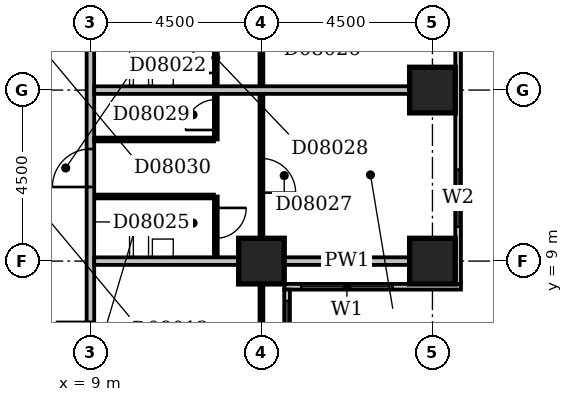
"""IFC4 building model, lengths in metres.
Left out: names, types, materials, properties, quantities, classifications, styles, units other than length and angle.
Written with IfcOpenShell. Run it as: python <this file> out.ifc"""

import sys

from ifc_helpers import new_model, si_unit, direction, frame, frame_2d, origin, origin_2d, place, context, subcontext, project, spatial, rectangle, extrude, element, fill, save


model = new_model("IFC4")
c1 = context("Model", 3, precision=1e-05, world=origin(), true_north=direction((0.0, 1.0)))
c2 = subcontext(c1, "Body", "Model", "MODEL_VIEW")
j1 = project(units=[si_unit("LENGTHUNIT", "METRE"), si_unit("PLANEANGLEUNIT", "RADIAN")], contexts=[c1])
p1 = place(None, origin())
s1 = spatial("IfcSite", under=j1, at=p1, CompositionType="ELEMENT")
p2 = place(p1, origin())
s2 = spatial("IfcBuilding", under=s1, at=p2, CompositionType="ELEMENT")
p3 = place(p2, frame((0.0, 0.0, 39.8)))
s3 = spatial("IfcBuildingStorey", under=s2, at=p3, CompositionType="ELEMENT", Elevation=39.8)
for number, where, z_axis, x_axis in (
    (1, (13.5, 9.0, -0.3), (0.0, 0.0, 1.0), (1.0, 0.0, 0.0)),
    (2, (18.0, 9.0, -0.3), (0.0, 0.0, 1.0), (1.0, 0.0, 0.0)),
    (3, (18.0, 13.5, -0.3), (0.0, 0.0, 1.0), (1.0, 0.0, 0.0)),
):
    element("IfcColumn", number, at=place(p3, frame(where, z_axis=z_axis, x_axis=x_axis)), inside=s3, PredefinedType="COLUMN", context=c2, shape_type="SweptSolid", body=[
        extrude(rectangle(XDim=1.2, YDim=1.2, at=origin_2d()), origin(), (0.0, 0.0, 1.0), 3.6),
    ])
p4 = place(p3, frame((14.175, 3.9, 0.0), z_axis=(0.0, 0.0, 1.0), x_axis=(0.0, 1.0, 0.0)))
e4 = element("IfcWall", 4, at=p4, inside=s3, PredefinedType="STANDARD", context=c2, shape_type="SweptSolid", body=[
    extrude(rectangle(XDim=4.35, YDim=0.15, at=frame_2d((2.175, 0.0))), origin(), (0.0, 0.0, 1.0), 2.7),
])
p5 = place(p4, frame((1.65, 0.0, 0.6)))
e5 = element("IfcOpeningElement", 5, at=p5, cuts=e4, PredefinedType="OPENING", context=c2, shape_type="SweptSolid", body=[
    extrude(rectangle(XDim=2.4, YDim=1.8, at=frame_2d((1.2, 0.9))), frame((0.0, 0.087, 0.0), z_axis=(0.0, -1.0, 0.0), x_axis=(1.0, 0.0, 0.0)), (0.0, 0.0, 1.0), 0.174),
])
p6 = place(p3, frame((14.1, 8.325, 0.0), z_axis=(0.0, 0.0, 1.0), x_axis=(1.0, 0.0, 0.0)))
e6 = element("IfcWall", 6, at=p6, inside=s3, PredefinedType="STANDARD", context=c2, shape_type="SweptSolid", body=[
    extrude(rectangle(XDim=4.65, YDim=0.15, at=frame_2d((2.325, 0.0))), origin(), (0.0, 0.0, 1.0), 2.7),
])
p7 = place(p6, frame((0.45, 0.0, 0.6)))
e7 = element("IfcOpeningElement", 7, at=p7, cuts=e6, PredefinedType="OPENING", context=c2, shape_type="SweptSolid", body=[
    extrude(rectangle(XDim=2.4, YDim=1.8, at=frame_2d((1.2, 0.9))), frame((0.0, 0.087, 0.0), z_axis=(0.0, -1.0, 0.0), x_axis=(1.0, 0.0, 0.0)), (0.0, 0.0, 1.0), 0.174),
])
p8 = place(p3, frame((18.675, 8.4, 0.0), z_axis=(0.0, 0.0, 1.0), x_axis=(0.0, 1.0, 0.0)))
e8 = element("IfcWall", 8, at=p8, inside=s3, PredefinedType="STANDARD", context=c2, shape_type="SweptSolid", body=[
    extrude(rectangle(XDim=8.85, YDim=0.15, at=frame_2d((4.425, 0.0))), origin(), (0.0, 0.0, 1.0), 2.7),
])
p9 = place(p8, frame((1.505, 0.0, 0.6)))
e9 = element("IfcOpeningElement", 9, at=p9, cuts=e8, PredefinedType="OPENING", context=c2, shape_type="SweptSolid", body=[
    extrude(rectangle(XDim=1.5, YDim=1.8, at=frame_2d((0.75, 0.9))), frame((0.0, 0.087, 0.0), z_axis=(0.0, -1.0, 0.0), x_axis=(1.0, 0.0, 0.0)), (0.0, 0.0, 1.0), 0.174),
])
p10 = place(p8, frame((6.15, 0.0, 0.6)))
e10 = element("IfcOpeningElement", 10, at=p10, cuts=e8, PredefinedType="OPENING", context=c2, shape_type="SweptSolid", body=[
    extrude(rectangle(XDim=2.4, YDim=1.8, at=frame_2d((1.2, 0.9))), frame((0.0, 0.087, 0.0), z_axis=(0.0, -1.0, 0.0), x_axis=(1.0, 0.0, 0.0)), (0.0, 0.0, 1.0), 0.174),
])
p11 = place(p3, frame((9.0, 5.0, 0.0), z_axis=(0.0, 0.0, 1.0), x_axis=(0.0, 1.0, 0.0)))
e11 = element("IfcWall", 11, at=p11, inside=s3, PredefinedType="PARTITIONING", context=c2, shape_type="SweptSolid", body=[
    extrude(rectangle(XDim=44.5, YDim=0.2, at=frame_2d((22.25, 0.0))), origin(), (0.0, 0.0, 1.0), 3.3),
])
p12 = place(p11, frame((17.8, 0.0, 0.0)))
e12 = element("IfcOpeningElement", 12, at=p12, cuts=e11, PredefinedType="OPENING", context=c2, shape_type="SweptSolid", body=[
    extrude(rectangle(XDim=1.0, YDim=2.1, at=frame_2d((0.5, 1.05))), frame((0.0, 0.112, 0.0), z_axis=(0.0, -1.0, 0.0), x_axis=(1.0, 0.0, 0.0)), (0.0, 0.0, 1.0), 0.224),
])
p13 = place(p11, frame((14.95, 0.0, 0.0)))
e13 = element("IfcOpeningElement", 13, at=p13, cuts=e11, PredefinedType="OPENING", context=c2, shape_type="SweptSolid", body=[
    extrude(rectangle(XDim=1.0, YDim=2.1, at=frame_2d((0.5, 1.05))), frame((0.0, 0.112, 0.0), z_axis=(0.0, -1.0, 0.0), x_axis=(1.0, 0.0, 0.0)), (0.0, 0.0, 1.0), 0.224),
])
p14 = place(p11, frame((10.45, 0.0, 0.0)))
e14 = element("IfcOpeningElement", 14, at=p14, cuts=e11, PredefinedType="OPENING", context=c2, shape_type="SweptSolid", body=[
    extrude(rectangle(XDim=1.0, YDim=2.1, at=frame_2d((0.5, 1.05))), frame((0.0, 0.112, 0.0), z_axis=(0.0, -1.0, 0.0), x_axis=(1.0, 0.0, 0.0)), (0.0, 0.0, 1.0), 0.224),
])
p15 = place(p11, frame((5.95, 0.0, 0.0)))
e15 = element("IfcOpeningElement", 15, at=p15, cuts=e11, PredefinedType="OPENING", context=c2, shape_type="SweptSolid", body=[
    extrude(rectangle(XDim=1.0, YDim=2.1, at=frame_2d((0.5, 1.05))), frame((0.0, 0.112, 0.0), z_axis=(0.0, -1.0, 0.0), x_axis=(1.0, 0.0, 0.0)), (0.0, 0.0, 1.0), 0.224),
])
p16 = place(p11, frame((32.75, 0.0, 0.0)))
e16 = element("IfcOpeningElement", 16, at=p16, cuts=e11, PredefinedType="OPENING", context=c2, shape_type="SweptSolid", body=[
    extrude(rectangle(XDim=0.9, YDim=2.1, at=frame_2d((0.45, 1.05))), frame((0.0, 0.112, 0.0), z_axis=(0.0, -1.0, 0.0), x_axis=(1.0, 0.0, 0.0)), (0.0, 0.0, 1.0), 0.224),
])
p17 = place(p11, frame((1.5, 0.0, 0.0)))
e17 = element("IfcOpeningElement", 17, at=p17, cuts=e11, PredefinedType="OPENING", context=c2, shape_type="SweptSolid", body=[
    extrude(rectangle(XDim=0.9, YDim=2.1, at=frame_2d((0.45, 1.05))), frame((0.0, 0.112, 0.0), z_axis=(0.0, -1.0, 0.0), x_axis=(1.0, 0.0, 0.0)), (0.0, 0.0, 1.0), 0.224),
])
p18 = place(p3, frame((13.5, 5.1, 0.0), z_axis=(0.0, 0.0, 1.0), x_axis=(0.0, 1.0, 0.0)))
e18 = element("IfcWall", 18, at=p18, inside=s3, PredefinedType="PARTITIONING", context=c2, shape_type="SweptSolid", body=[
    extrude(rectangle(XDim=3.3, YDim=0.1, at=frame_2d((1.65, 0.0))), origin(), (0.0, 0.0, 1.0), 2.7),
])
p19 = place(p3, frame((9.1, 9.0, 0.0), z_axis=(0.0, 0.0, 1.0), x_axis=(1.0, 0.0, 0.0)))
e19 = element("IfcWall", 19, at=p19, inside=s3, PredefinedType="PARTITIONING", context=c2, shape_type="SweptSolid", body=[
    extrude(rectangle(XDim=3.8, YDim=0.2, at=frame_2d((1.9, 0.0))), origin(), (0.0, 0.0, 1.0), 3.3),
])
p20 = place(p3, frame((14.1, 9.0, 0.0), z_axis=(0.0, 0.0, 1.0), x_axis=(1.0, 0.0, 0.0)))
e20 = element("IfcWall", 20, at=p20, inside=s3, PredefinedType="PARTITIONING", context=c2, shape_type="SweptSolid", body=[
    extrude(rectangle(XDim=3.3, YDim=0.2, at=frame_2d((1.65, 0.0))), origin(), (0.0, 0.0, 1.0), 2.7),
])
p21 = place(p3, frame((12.3, 9.1, 0.0), z_axis=(0.0, 0.0, 1.0), x_axis=(0.0, 1.0, 0.0)))
e21 = element("IfcWall", 21, at=p21, inside=s3, PredefinedType="PARTITIONING", context=c2, shape_type="SweptSolid", body=[
    extrude(rectangle(XDim=1.6, YDim=0.1, at=frame_2d((0.8, 0.0))), origin(), (0.0, 0.0, 1.0), 3.3),
])
p22 = place(p21, frame((0.5, 0.0, 0.0)))
e22 = element("IfcOpeningElement", 22, at=p22, cuts=e21, PredefinedType="OPENING", context=c2, shape_type="SweptSolid", body=[
    extrude(rectangle(XDim=0.8, YDim=2.1, at=frame_2d((0.4, 1.05))), frame((0.0, 0.062, 0.0), z_axis=(0.0, -1.0, 0.0), x_axis=(1.0, 0.0, 0.0)), (0.0, 0.0, 1.0), 0.124),
])
p23 = place(p3, frame((13.5, 9.6, 0.0), z_axis=(0.0, 0.0, 1.0), x_axis=(0.0, 1.0, 0.0)))
e23 = element("IfcWall", 23, at=p23, inside=s3, PredefinedType="PARTITIONING", context=c2, shape_type="SweptSolid", body=[
    extrude(rectangle(XDim=8.3, YDim=0.1, at=frame_2d((4.15, 0.0))), origin(), (0.0, 0.0, 1.0), 3.3),
])
p24 = place(p23, frame((5.7, 0.0, 0.0)))
e24 = element("IfcOpeningElement", 24, at=p24, cuts=e23, PredefinedType="OPENING", context=c2, shape_type="SweptSolid", body=[
    extrude(rectangle(XDim=0.9, YDim=2.1, at=frame_2d((0.45, 1.05))), frame((0.0, 0.062, 0.0), z_axis=(0.0, -1.0, 0.0), x_axis=(1.0, 0.0, 0.0)), (0.0, 0.0, 1.0), 0.124),
])
p25 = place(p23, frame((1.2, 0.0, 0.0)))
e25 = element("IfcOpeningElement", 25, at=p25, cuts=e23, PredefinedType="OPENING", context=c2, shape_type="SweptSolid", body=[
    extrude(rectangle(XDim=0.9, YDim=2.1, at=frame_2d((0.45, 1.05))), frame((0.0, 0.062, 0.0), z_axis=(0.0, -1.0, 0.0), x_axis=(1.0, 0.0, 0.0)), (0.0, 0.0, 1.0), 0.124),
])
p26 = place(p3, frame((9.1, 10.7, 0.0), z_axis=(0.0, 0.0, 1.0), x_axis=(1.0, 0.0, 0.0)))
e26 = element("IfcWall", 26, at=p26, inside=s3, PredefinedType="PLUMBINGWALL", context=c2, shape_type="SweptSolid", body=[
    extrude(rectangle(XDim=3.15, YDim=0.1, at=frame_2d((1.575, 0.0))), origin(), (0.0, 0.0, 1.0), 3.3),
])
p27 = place(p3, frame((9.1, 12.2, 0.0), z_axis=(0.0, 0.0, 1.0), x_axis=(1.0, 0.0, 0.0)))
e27 = element("IfcWall", 27, at=p27, inside=s3, PredefinedType="PARTITIONING", context=c2, shape_type="SweptSolid", body=[
    extrude(rectangle(XDim=3.15, YDim=0.1, at=frame_2d((1.575, 0.0))), origin(), (0.0, 0.0, 1.0), 3.3),
])
p28 = place(p3, frame((12.3, 12.2, 0.0), z_axis=(0.0, 0.0, 1.0), x_axis=(0.0, 1.0, 0.0)))
e28 = element("IfcWall", 28, at=p28, inside=s3, PredefinedType="PARTITIONING", context=c2, shape_type="SweptSolid", body=[
    extrude(rectangle(XDim=3.0, YDim=0.1, at=frame_2d((1.5, 0.0))), origin(), (0.0, 0.0, 1.0), 3.3),
])
p29 = place(p28, frame((1.75, 0.0, 0.0)))
e29 = element("IfcOpeningElement", 29, at=p29, cuts=e28, PredefinedType="OPENING", context=c2, shape_type="SweptSolid", body=[
    extrude(rectangle(XDim=0.8, YDim=2.1, at=frame_2d((0.4, 1.05))), frame((0.0, 0.062, 0.0), z_axis=(0.0, -1.0, 0.0), x_axis=(1.0, 0.0, 0.0)), (0.0, 0.0, 1.0), 0.124),
])
p30 = place(p28, frame((0.25, 0.0, 0.0)))
e30 = element("IfcOpeningElement", 30, at=p30, cuts=e28, PredefinedType="OPENING", context=c2, shape_type="SweptSolid", body=[
    extrude(rectangle(XDim=0.8, YDim=2.1, at=frame_2d((0.4, 1.05))), frame((0.0, 0.062, 0.0), z_axis=(0.0, -1.0, 0.0), x_axis=(1.0, 0.0, 0.0)), (0.0, 0.0, 1.0), 0.124),
])
p31 = place(p3, frame((9.1, 13.5, 0.0), z_axis=(0.0, 0.0, 1.0), x_axis=(1.0, 0.0, 0.0)))
e31 = element("IfcWall", 31, at=p31, inside=s3, PredefinedType="PARTITIONING", context=c2, shape_type="SweptSolid", body=[
    extrude(rectangle(XDim=8.3, YDim=0.2, at=frame_2d((4.15, 0.0))), origin(), (0.0, 0.0, 1.0), 3.3),
])
p32 = place(p5, origin())
e32 = element("IfcWindow", 32, at=p32, inside=s3, PartitioningType="SINGLE_PANEL", PredefinedType="WINDOW", context=c2, shape_type="SweptSolid", body=[
    extrude(rectangle(XDim=2.4, YDim=1.8, at=frame_2d((1.2, 0.9))), frame((0.0, 0.03, 0.0), z_axis=(0.0, -1.0, 0.0), x_axis=(1.0, 0.0, 0.0)), (0.0, 0.0, 1.0), 0.06),
])
fill(e5, e32)
p33 = place(p7, origin())
e33 = element("IfcWindow", 33, at=p33, inside=s3, PartitioningType="SINGLE_PANEL", PredefinedType="WINDOW", context=c2, shape_type="SweptSolid", body=[
    extrude(rectangle(XDim=2.4, YDim=1.8, at=frame_2d((1.2, 0.9))), frame((0.0, 0.03, 0.0), z_axis=(0.0, -1.0, 0.0), x_axis=(1.0, 0.0, 0.0)), (0.0, 0.0, 1.0), 0.06),
])
fill(e7, e33)
p34 = place(p9, origin())
e34 = element("IfcWindow", 34, at=p34, inside=s3, PartitioningType="SINGLE_PANEL", PredefinedType="WINDOW", context=c2, shape_type="SweptSolid", body=[
    extrude(rectangle(XDim=1.5, YDim=1.8, at=frame_2d((0.75, 0.9))), frame((0.0, 0.03, 0.0), z_axis=(0.0, -1.0, 0.0), x_axis=(1.0, 0.0, 0.0)), (0.0, 0.0, 1.0), 0.06),
])
fill(e9, e34)
p35 = place(p15, origin())
e35 = element("IfcDoor", 35, at=p35, inside=s3, OperationType="SINGLE_SWING_LEFT", PredefinedType="DOOR", context=c2, shape_type="SweptSolid", body=[
    extrude(rectangle(XDim=1.0, YDim=2.1, at=frame_2d((0.5, 1.05))), frame((0.0, 0.025, 0.0), z_axis=(0.0, -1.0, 0.0), x_axis=(1.0, 0.0, 0.0)), (0.0, 0.0, 1.0), 0.05),
])
fill(e15, e35)
p36 = place(p22, origin())
e36 = element("IfcDoor", 36, at=p36, inside=s3, OperationType="SINGLE_SWING_RIGHT", PredefinedType="DOOR", context=c2, shape_type="SweptSolid", body=[
    extrude(rectangle(XDim=0.8, YDim=2.1, at=frame_2d((0.4, 1.05))), frame((0.0, 0.025, 0.0), z_axis=(0.0, -1.0, 0.0), x_axis=(1.0, 0.0, 0.0)), (0.0, 0.0, 1.0), 0.05),
])
fill(e22, e36)
p37 = place(p25, frame((0.9, 0.0, 0.0), z_axis=(0.0, 0.0, 1.0), x_axis=(-1.0, 0.0, 0.0)))
e37 = element("IfcDoor", 37, at=p37, inside=s3, OperationType="SINGLE_SWING_RIGHT", PredefinedType="DOOR", context=c2, shape_type="SweptSolid", body=[
    extrude(rectangle(XDim=0.9, YDim=2.1, at=frame_2d((0.45, 1.05))), frame((0.0, 0.025, 0.0), z_axis=(0.0, -1.0, 0.0), x_axis=(1.0, 0.0, 0.0)), (0.0, 0.0, 1.0), 0.05),
])
fill(e25, e37)
p38 = place(p29, origin())
e38 = element("IfcDoor", 38, at=p38, inside=s3, OperationType="SINGLE_SWING_LEFT", PredefinedType="DOOR", context=c2, shape_type="SweptSolid", body=[
    extrude(rectangle(XDim=0.8, YDim=2.1, at=frame_2d((0.4, 1.05))), frame((0.0, 0.025, 0.0), z_axis=(0.0, -1.0, 0.0), x_axis=(1.0, 0.0, 0.0)), (0.0, 0.0, 1.0), 0.05),
])
fill(e29, e38)
p39 = place(p30, origin())
e39 = element("IfcDoor", 39, at=p39, inside=s3, OperationType="SINGLE_SWING_LEFT", PredefinedType="DOOR", context=c2, shape_type="SweptSolid", body=[
    extrude(rectangle(XDim=0.8, YDim=2.1, at=frame_2d((0.4, 1.05))), frame((0.0, 0.025, 0.0), z_axis=(0.0, -1.0, 0.0), x_axis=(1.0, 0.0, 0.0)), (0.0, 0.0, 1.0), 0.05),
])
fill(e30, e39)
save(model, sys.argv[1])
